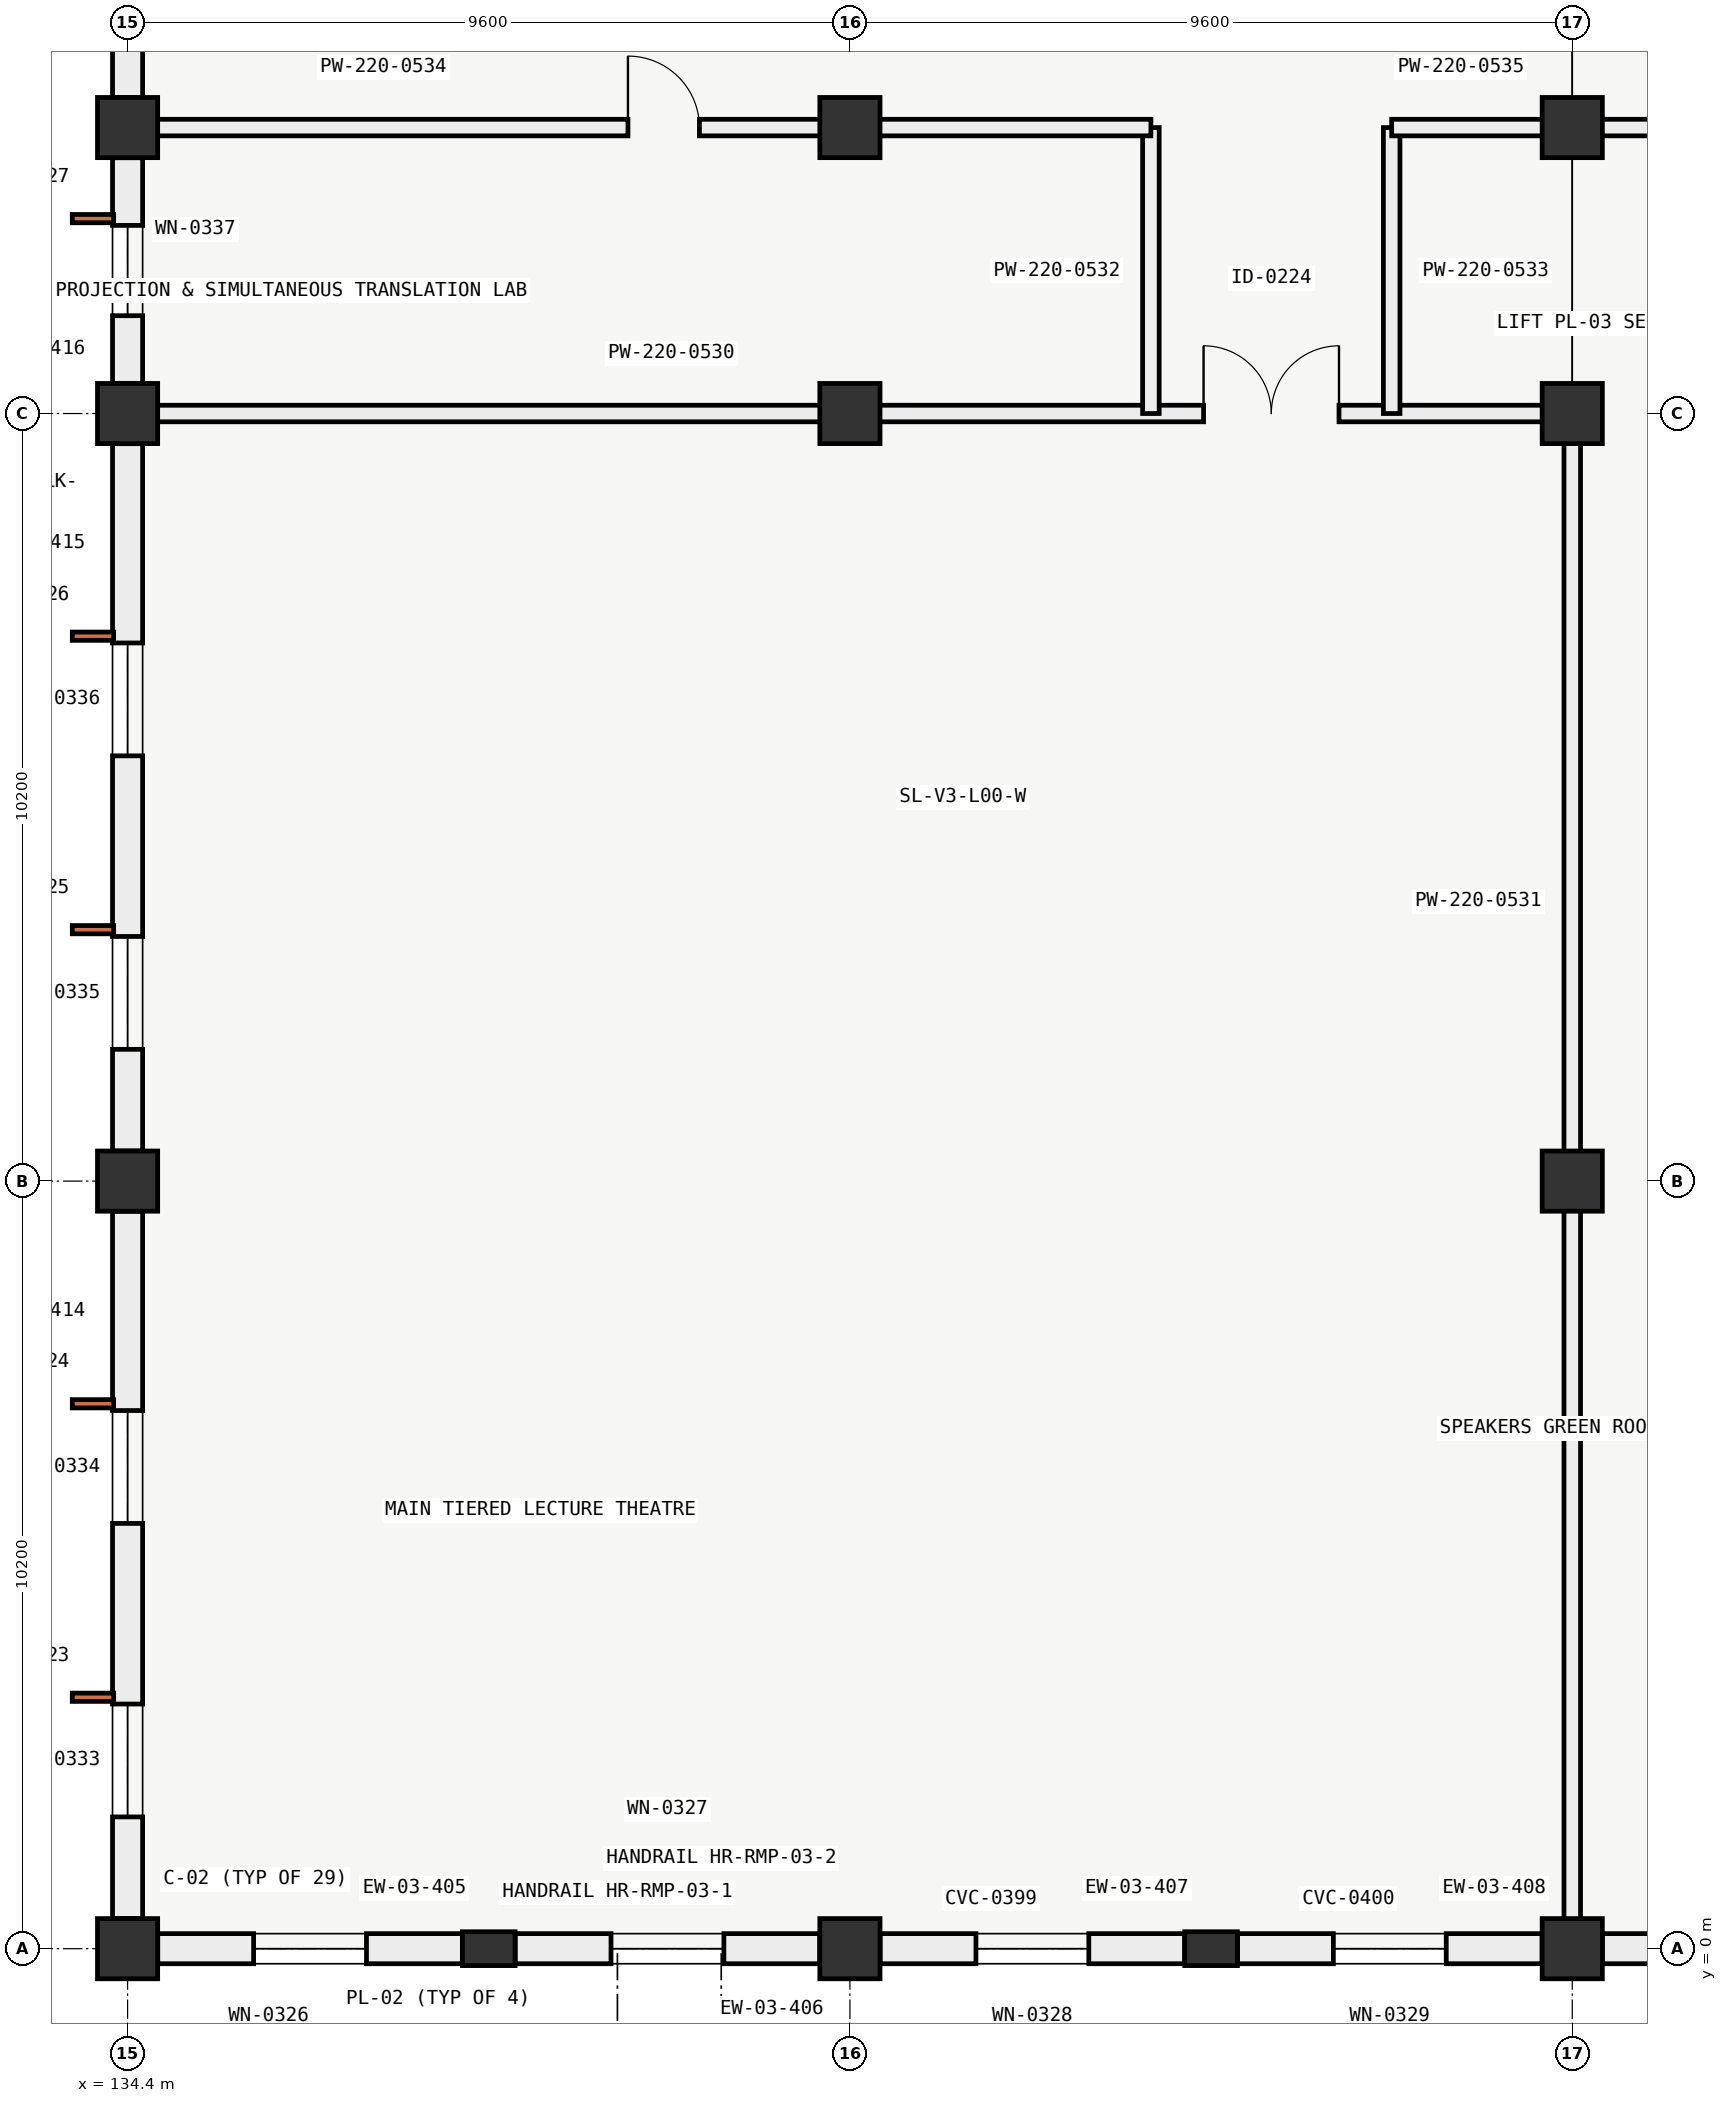
"""IFC4 building model, lengths in metres.
Left out: names, types, materials, properties, quantities, classifications, styles, units other than length and angle.
Written with IfcOpenShell. Run it as: python <this file> out.ifc"""

import sys

from ifc_helpers import new_model, si_unit, direction, frame, frame_2d, origin, origin_2d, place, context, subcontext, project, spatial, rectangle, extrude, element, fill, save


model = new_model("IFC4")
c1 = context("Model", 3, precision=1e-05, world=origin(), true_north=direction((0.0, 1.0)))
c2 = subcontext(c1, "Body", "Model", "MODEL_VIEW")
j1 = project(units=[si_unit("LENGTHUNIT", "METRE"), si_unit("PLANEANGLEUNIT", "RADIAN")], contexts=[c1])
p1 = place(None, origin())
s1 = spatial("IfcSite", under=j1, at=p1, CompositionType="ELEMENT")
p2 = place(p1, origin())
s2 = spatial("IfcBuilding", under=s1, at=p2, CompositionType="ELEMENT")
p3 = place(p2, origin())
s3 = spatial("IfcBuildingStorey", under=s2, at=p3, CompositionType="ELEMENT", Elevation=0.0)
for number, where, z_axis, x_axis in (
    (1, (134.4, 0.0, 0.0), (0.0, 0.0, 1.0), (1.0, 0.0, 0.0)),
    (2, (134.4, 10.2, 0.0), (0.0, 0.0, 1.0), (1.0, 0.0, 0.0)),
    (3, (134.4, 20.4, 0.0), (0.0, 0.0, 1.0), (1.0, 0.0, 0.0)),
    (4, (134.4, 24.2, 0.0), (0.0, 0.0, 1.0), (1.0, 0.0, 0.0)),
    (5, (144.0, 0.0, 0.0), (0.0, 0.0, 1.0), (1.0, 0.0, 0.0)),
    (6, (144.0, 20.4, 0.0), (0.0, 0.0, 1.0), (1.0, 0.0, 0.0)),
    (7, (144.0, 24.2, 0.0), (0.0, 0.0, 1.0), (1.0, 0.0, 0.0)),
    (8, (153.6, 0.0, 0.0), (0.0, 0.0, 1.0), (1.0, 0.0, 0.0)),
    (9, (153.6, 10.2, 0.0), (0.0, 0.0, 1.0), (1.0, 0.0, 0.0)),
    (10, (153.6, 20.4, 0.0), (0.0, 0.0, 1.0), (1.0, 0.0, 0.0)),
    (11, (153.6, 24.2, 0.0), (0.0, 0.0, 1.0), (1.0, 0.0, 0.0)),
):
    element("IfcColumn", number, at=place(p3, frame(where, z_axis=z_axis, x_axis=x_axis)), inside=s3, PredefinedType="COLUMN", context=c2, shape_type="SweptSolid", body=[
        extrude(rectangle(XDim=0.8, YDim=0.8, at=origin_2d()), origin(), (0.0, 0.0, 1.0), 5.4),
    ])
for number, where, z_axis, x_axis in (
    (12, (139.2, 0.0, 0.0), (0.0, 0.0, 1.0), (0.0, 1.0, 0.0)),
    (13, (148.8, 0.0, 0.0), (0.0, 0.0, 1.0), (0.0, 1.0, 0.0)),
):
    element("IfcColumn", number, at=place(p3, frame(where, z_axis=z_axis, x_axis=x_axis)), inside=s3, PredefinedType="PILASTER", context=c2, shape_type="SweptSolid", body=[
        extrude(rectangle(XDim=0.45, YDim=0.7, at=origin_2d()), origin(), (0.0, 0.0, 1.0), 5.4),
    ])
p4 = place(p3, frame((138.849, 0.0, 0.0), z_axis=(0.0, 0.0, 1.0), x_axis=(-1.0, 0.0, 0.0)))
e14 = element("IfcWall", 14, at=p4, inside=s3, PredefinedType="SOLIDWALL", context=c2, shape_type="SweptSolid", body=[
    extrude(rectangle(XDim=4.048, YDim=0.4, at=frame_2d((2.024, 0.0))), origin(), (0.0, 0.0, 1.0), 4.5),
])
p5 = place(p4, frame((1.274, 0.0, 0.85)))
e15 = element("IfcOpeningElement", 15, at=p5, cuts=e14, PredefinedType="OPENING", context=c2, shape_type="SweptSolid", body=[
    extrude(rectangle(XDim=1.5, YDim=2.6, at=frame_2d((0.75, 1.3))), frame((0.0, 0.21, 0.0), z_axis=(0.0, -1.0, 0.0), x_axis=(1.0, 0.0, 0.0)), (0.0, 0.0, 1.0), 0.42),
])
p6 = place(p3, frame((143.599, 0.0, 0.0), z_axis=(0.0, 0.0, 1.0), x_axis=(-1.0, 0.0, 0.0)))
e16 = element("IfcWall", 16, at=p6, inside=s3, PredefinedType="SOLIDWALL", context=c2, shape_type="SweptSolid", body=[
    extrude(rectangle(XDim=4.048, YDim=0.4, at=frame_2d((2.024, 0.0))), origin(), (0.0, 0.0, 1.0), 4.5),
])
p7 = place(p6, frame((1.274, 0.0, 0.85)))
e17 = element("IfcOpeningElement", 17, at=p7, cuts=e16, PredefinedType="OPENING", context=c2, shape_type="SweptSolid", body=[
    extrude(rectangle(XDim=1.5, YDim=2.6, at=frame_2d((0.75, 1.3))), frame((0.0, 0.21, 0.0), z_axis=(0.0, -1.0, 0.0), x_axis=(1.0, 0.0, 0.0)), (0.0, 0.0, 1.0), 0.42),
])
p8 = place(p3, frame((148.449, 0.0, 0.0), z_axis=(0.0, 0.0, 1.0), x_axis=(-1.0, 0.0, 0.0)))
e18 = element("IfcWall", 18, at=p8, inside=s3, PredefinedType="SOLIDWALL", context=c2, shape_type="SweptSolid", body=[
    extrude(rectangle(XDim=4.048, YDim=0.4, at=frame_2d((2.024, 0.0))), origin(), (0.0, 0.0, 1.0), 4.5),
])
p9 = place(p8, frame((1.274, 0.0, 0.85)))
e19 = element("IfcOpeningElement", 19, at=p9, cuts=e18, PredefinedType="OPENING", context=c2, shape_type="SweptSolid", body=[
    extrude(rectangle(XDim=1.5, YDim=2.6, at=frame_2d((0.75, 1.3))), frame((0.0, 0.21, 0.0), z_axis=(0.0, -1.0, 0.0), x_axis=(1.0, 0.0, 0.0)), (0.0, 0.0, 1.0), 0.42),
])
p10 = place(p3, frame((153.199, 0.0, 0.0), z_axis=(0.0, 0.0, 1.0), x_axis=(-1.0, 0.0, 0.0)))
e20 = element("IfcWall", 20, at=p10, inside=s3, PredefinedType="SOLIDWALL", context=c2, shape_type="SweptSolid", body=[
    extrude(rectangle(XDim=4.048, YDim=0.4, at=frame_2d((2.024, 0.0))), origin(), (0.0, 0.0, 1.0), 4.5),
])
p11 = place(p10, frame((1.274, 0.0, 0.85)))
e21 = element("IfcOpeningElement", 21, at=p11, cuts=e20, PredefinedType="OPENING", context=c2, shape_type="SweptSolid", body=[
    extrude(rectangle(XDim=1.5, YDim=2.6, at=frame_2d((0.75, 1.3))), frame((0.0, 0.21, 0.0), z_axis=(0.0, -1.0, 0.0), x_axis=(1.0, 0.0, 0.0)), (0.0, 0.0, 1.0), 0.42),
])
p12 = place(p3, frame((158.049, 0.0, 0.0), z_axis=(0.0, 0.0, 1.0), x_axis=(-1.0, 0.0, 0.0)))
e22 = element("IfcWall", 22, at=p12, inside=s3, PredefinedType="SOLIDWALL", context=c2, shape_type="SweptSolid", body=[
    extrude(rectangle(XDim=4.048, YDim=0.4, at=frame_2d((2.024, 0.0))), origin(), (0.0, 0.0, 1.0), 4.45),
])
p13 = place(p12, frame((1.274, 0.0, 0.85)))
e23 = element("IfcOpeningElement", 23, at=p13, cuts=e22, PredefinedType="OPENING", context=c2, shape_type="SweptSolid", body=[
    extrude(rectangle(XDim=1.5, YDim=2.6, at=frame_2d((0.75, 1.3))), frame((0.0, 0.21, 0.0), z_axis=(0.0, -1.0, 0.0), x_axis=(1.0, 0.0, 0.0)), (0.0, 0.0, 1.0), 0.42),
])
p14 = place(p3, frame((134.4, 0.401, 0.0), z_axis=(0.0, 0.0, 1.0), x_axis=(0.0, 1.0, 0.0)))
e24 = element("IfcWall", 24, at=p14, inside=s3, PredefinedType="SOLIDWALL", context=c2, shape_type="SweptSolid", body=[
    extrude(rectangle(XDim=9.398, YDim=0.4, at=frame_2d((4.699, 0.0))), origin(), (0.0, 0.0, 1.0), 4.5),
])
p15 = place(p14, frame((1.35, 0.0, 0.85)))
e25 = element("IfcOpeningElement", 25, at=p15, cuts=e24, PredefinedType="OPENING", context=c2, shape_type="SweptSolid", body=[
    extrude(rectangle(XDim=1.5, YDim=2.6, at=frame_2d((0.75, 1.3))), frame((0.0, 0.21, 0.0), z_axis=(0.0, -1.0, 0.0), x_axis=(1.0, 0.0, 0.0)), (0.0, 0.0, 1.0), 0.42),
])
p16 = place(p14, frame((5.25, 0.0, 0.85)))
e26 = element("IfcOpeningElement", 26, at=p16, cuts=e24, PredefinedType="OPENING", context=c2, shape_type="SweptSolid", body=[
    extrude(rectangle(XDim=1.5, YDim=2.6, at=frame_2d((0.75, 1.3))), frame((0.0, 0.21, 0.0), z_axis=(0.0, -1.0, 0.0), x_axis=(1.0, 0.0, 0.0)), (0.0, 0.0, 1.0), 0.42),
])
p17 = place(p3, frame((134.4, 10.601, 0.0), z_axis=(0.0, 0.0, 1.0), x_axis=(0.0, 1.0, 0.0)))
e27 = element("IfcWall", 27, at=p17, inside=s3, PredefinedType="SOLIDWALL", context=c2, shape_type="SweptSolid", body=[
    extrude(rectangle(XDim=9.398, YDim=0.4, at=frame_2d((4.699, 0.0))), origin(), (0.0, 0.0, 1.0), 4.5),
])
p18 = place(p17, frame((1.35, 0.0, 0.85)))
e28 = element("IfcOpeningElement", 28, at=p18, cuts=e27, PredefinedType="OPENING", context=c2, shape_type="SweptSolid", body=[
    extrude(rectangle(XDim=1.5, YDim=2.6, at=frame_2d((0.75, 1.3))), frame((0.0, 0.21, 0.0), z_axis=(0.0, -1.0, 0.0), x_axis=(1.0, 0.0, 0.0)), (0.0, 0.0, 1.0), 0.42),
])
p19 = place(p17, frame((5.25, 0.0, 0.85)))
e29 = element("IfcOpeningElement", 29, at=p19, cuts=e27, PredefinedType="OPENING", context=c2, shape_type="SweptSolid", body=[
    extrude(rectangle(XDim=1.5, YDim=2.6, at=frame_2d((0.75, 1.3))), frame((0.0, 0.21, 0.0), z_axis=(0.0, -1.0, 0.0), x_axis=(1.0, 0.0, 0.0)), (0.0, 0.0, 1.0), 0.42),
])
p20 = place(p3, frame((134.4, 20.801, 0.0), z_axis=(0.0, 0.0, 1.0), x_axis=(0.0, 1.0, 0.0)))
e30 = element("IfcWall", 30, at=p20, inside=s3, PredefinedType="SOLIDWALL", context=c2, shape_type="SweptSolid", body=[
    extrude(rectangle(XDim=2.998, YDim=0.4, at=frame_2d((1.499, 0.0))), origin(), (0.0, 0.0, 1.0), 4.45),
])
p21 = place(p20, frame((0.899, 0.0, 0.9)))
e31 = element("IfcOpeningElement", 31, at=p21, cuts=e30, PredefinedType="OPENING", context=c2, shape_type="SweptSolid", body=[
    extrude(rectangle(XDim=1.2, YDim=1.8, at=frame_2d((0.6, 0.9))), frame((0.0, 0.21, 0.0), z_axis=(0.0, -1.0, 0.0), x_axis=(1.0, 0.0, 0.0)), (0.0, 0.0, 1.0), 0.42),
])
p22 = place(p3, frame((134.4, 24.601, 0.0), z_axis=(0.0, 0.0, 1.0), x_axis=(0.0, 1.0, 0.0)))
e32 = element("IfcWall", 32, at=p22, inside=s3, PredefinedType="SOLIDWALL", context=c2, shape_type="SweptSolid", body=[
    extrude(rectangle(XDim=2.398, YDim=0.4, at=frame_2d((1.199, 0.0))), origin(), (0.0, 0.0, 1.0), 4.45),
])
p23 = place(p3, frame((134.55, 20.4, 0.0), z_axis=(0.0, 0.0, 1.0), x_axis=(1.0, 0.0, 0.0)))
e33 = element("IfcWall", 33, at=p23, inside=s3, PredefinedType="PARTITIONING", context=c2, shape_type="SweptSolid", body=[
    extrude(rectangle(XDim=19.05, YDim=0.22, at=frame_2d((9.525, 0.0))), origin(), (0.0, 0.0, 1.0), 4.4),
])
p24 = place(p23, frame((14.15, 0.0, 0.0)))
e34 = element("IfcOpeningElement", 34, at=p24, cuts=e33, PredefinedType="OPENING", context=c2, shape_type="SweptSolid", body=[
    extrude(rectangle(XDim=1.8, YDim=2.2, at=frame_2d((0.9, 1.1))), frame((0.0, 0.12, 0.0), z_axis=(0.0, -1.0, 0.0), x_axis=(1.0, 0.0, 0.0)), (0.0, 0.0, 1.0), 0.24),
])
p25 = place(p3, frame((153.6, 0.15, 0.0), z_axis=(0.0, 0.0, 1.0), x_axis=(0.0, 1.0, 0.0)))
e35 = element("IfcWall", 35, at=p25, inside=s3, PredefinedType="PARTITIONING", context=c2, shape_type="SweptSolid", body=[
    extrude(rectangle(XDim=20.25, YDim=0.22, at=frame_2d((10.125, 0.0))), origin(), (0.0, 0.0, 1.0), 4.4),
])
for number, where, z_axis, x_axis in (
    (36, (148.0, 20.4, 0.0), (0.0, 0.0, 1.0), (0.0, 1.0, 0.0)),
    (37, (151.2, 20.4, 0.0), (0.0, 0.0, 1.0), (0.0, 1.0, 0.0)),
):
    element("IfcWall", number, at=place(p3, frame(where, z_axis=z_axis, x_axis=x_axis)), inside=s3, PredefinedType="PARTITIONING", context=c2, shape_type="SweptSolid", body=[
        extrude(rectangle(XDim=3.8, YDim=0.22, at=frame_2d((1.9, 0.0))), origin(), (0.0, 0.0, 1.0), 4.4),
    ])
p26 = place(p3, frame((134.55, 24.2, 0.0), z_axis=(0.0, 0.0, 1.0), x_axis=(1.0, 0.0, 0.0)))
e38 = element("IfcWall", 38, at=p26, inside=s3, PredefinedType="PARTITIONING", context=c2, shape_type="SweptSolid", body=[
    extrude(rectangle(XDim=13.45, YDim=0.22, at=frame_2d((6.725, 0.0))), origin(), (0.0, 0.0, 1.0), 4.45),
])
p27 = place(p26, frame((6.5, 0.0, 0.0)))
e39 = element("IfcOpeningElement", 39, at=p27, cuts=e38, PredefinedType="OPENING", context=c2, shape_type="SweptSolid", body=[
    extrude(rectangle(XDim=0.95, YDim=2.1, at=frame_2d((0.475, 1.05))), frame((0.0, 0.12, 0.0), z_axis=(0.0, -1.0, 0.0), x_axis=(1.0, 0.0, 0.0)), (0.0, 0.0, 1.0), 0.24),
])
p28 = place(p3, frame((151.2, 24.2, 0.0), z_axis=(0.0, 0.0, 1.0), x_axis=(1.0, 0.0, 0.0)))
e40 = element("IfcWall", 40, at=p28, inside=s3, PredefinedType="PARTITIONING", context=c2, shape_type="SweptSolid", body=[
    extrude(rectangle(XDim=7.55, YDim=0.22, at=frame_2d((3.775, 0.0))), origin(), (0.0, 0.0, 1.0), 4.45),
])
p29 = place(p28, frame((4.6, 0.0, 0.0)))
e41 = element("IfcOpeningElement", 41, at=p29, cuts=e40, PredefinedType="OPENING", context=c2, shape_type="SweptSolid", body=[
    extrude(rectangle(XDim=0.95, YDim=2.1, at=frame_2d((0.475, 1.05))), frame((0.0, 0.12, 0.0), z_axis=(0.0, -1.0, 0.0), x_axis=(1.0, 0.0, 0.0)), (0.0, 0.0, 1.0), 0.24),
])
p30 = place(p5, origin())
e42 = element("IfcWindow", 42, at=p30, inside=s3, PartitioningType="SINGLE_PANEL", PredefinedType="WINDOW", context=c2, shape_type="SweptSolid", body=[
    extrude(rectangle(XDim=1.5, YDim=2.6, at=frame_2d((0.75, 1.3))), frame((0.0, 0.03, 0.0), z_axis=(0.0, -1.0, 0.0), x_axis=(1.0, 0.0, 0.0)), (0.0, 0.0, 1.0), 0.06),
])
fill(e15, e42)
p31 = place(p7, origin())
e43 = element("IfcWindow", 43, at=p31, inside=s3, PartitioningType="SINGLE_PANEL", PredefinedType="WINDOW", context=c2, shape_type="SweptSolid", body=[
    extrude(rectangle(XDim=1.5, YDim=2.6, at=frame_2d((0.75, 1.3))), frame((0.0, 0.03, 0.0), z_axis=(0.0, -1.0, 0.0), x_axis=(1.0, 0.0, 0.0)), (0.0, 0.0, 1.0), 0.06),
])
fill(e17, e43)
p32 = place(p9, origin())
e44 = element("IfcWindow", 44, at=p32, inside=s3, PartitioningType="SINGLE_PANEL", PredefinedType="WINDOW", context=c2, shape_type="SweptSolid", body=[
    extrude(rectangle(XDim=1.5, YDim=2.6, at=frame_2d((0.75, 1.3))), frame((0.0, 0.03, 0.0), z_axis=(0.0, -1.0, 0.0), x_axis=(1.0, 0.0, 0.0)), (0.0, 0.0, 1.0), 0.06),
])
fill(e19, e44)
p33 = place(p11, origin())
e45 = element("IfcWindow", 45, at=p33, inside=s3, PartitioningType="SINGLE_PANEL", PredefinedType="WINDOW", context=c2, shape_type="SweptSolid", body=[
    extrude(rectangle(XDim=1.5, YDim=2.6, at=frame_2d((0.75, 1.3))), frame((0.0, 0.03, 0.0), z_axis=(0.0, -1.0, 0.0), x_axis=(1.0, 0.0, 0.0)), (0.0, 0.0, 1.0), 0.06),
])
fill(e21, e45)
p34 = place(p15, origin())
e46 = element("IfcWindow", 46, at=p34, inside=s3, PartitioningType="SINGLE_PANEL", PredefinedType="WINDOW", context=c2, shape_type="SweptSolid", body=[
    extrude(rectangle(XDim=1.5, YDim=2.6, at=frame_2d((0.75, 1.3))), frame((0.0, 0.03, 0.0), z_axis=(0.0, -1.0, 0.0), x_axis=(1.0, 0.0, 0.0)), (0.0, 0.0, 1.0), 0.06),
])
fill(e25, e46)
p35 = place(p16, origin())
e47 = element("IfcWindow", 47, at=p35, inside=s3, PartitioningType="SINGLE_PANEL", PredefinedType="WINDOW", context=c2, shape_type="SweptSolid", body=[
    extrude(rectangle(XDim=1.5, YDim=2.6, at=frame_2d((0.75, 1.3))), frame((0.0, 0.03, 0.0), z_axis=(0.0, -1.0, 0.0), x_axis=(1.0, 0.0, 0.0)), (0.0, 0.0, 1.0), 0.06),
])
fill(e26, e47)
p36 = place(p18, origin())
e48 = element("IfcWindow", 48, at=p36, inside=s3, PartitioningType="SINGLE_PANEL", PredefinedType="WINDOW", context=c2, shape_type="SweptSolid", body=[
    extrude(rectangle(XDim=1.5, YDim=2.6, at=frame_2d((0.75, 1.3))), frame((0.0, 0.03, 0.0), z_axis=(0.0, -1.0, 0.0), x_axis=(1.0, 0.0, 0.0)), (0.0, 0.0, 1.0), 0.06),
])
fill(e28, e48)
p37 = place(p19, origin())
e49 = element("IfcWindow", 49, at=p37, inside=s3, PartitioningType="SINGLE_PANEL", PredefinedType="WINDOW", context=c2, shape_type="SweptSolid", body=[
    extrude(rectangle(XDim=1.5, YDim=2.6, at=frame_2d((0.75, 1.3))), frame((0.0, 0.03, 0.0), z_axis=(0.0, -1.0, 0.0), x_axis=(1.0, 0.0, 0.0)), (0.0, 0.0, 1.0), 0.06),
])
fill(e29, e49)
p38 = place(p21, origin())
e50 = element("IfcWindow", 50, at=p38, inside=s3, PartitioningType="SINGLE_PANEL", PredefinedType="WINDOW", context=c2, shape_type="SweptSolid", body=[
    extrude(rectangle(XDim=1.2, YDim=1.8, at=frame_2d((0.6, 0.9))), frame((0.0, 0.03, 0.0), z_axis=(0.0, -1.0, 0.0), x_axis=(1.0, 0.0, 0.0)), (0.0, 0.0, 1.0), 0.06),
])
fill(e31, e50)
p39 = place(p24, origin())
e51 = element("IfcDoor", 51, at=p39, inside=s3, OperationType="DOUBLE_DOOR_SINGLE_SWING", PredefinedType="DOOR", context=c2, shape_type="SweptSolid", body=[
    extrude(rectangle(XDim=1.8, YDim=2.2, at=frame_2d((0.9, 1.1))), frame((0.0, 0.025, 0.0), z_axis=(0.0, -1.0, 0.0), x_axis=(1.0, 0.0, 0.0)), (0.0, 0.0, 1.0), 0.05),
])
fill(e34, e51)
p40 = place(p27, origin())
e52 = element("IfcDoor", 52, at=p40, inside=s3, OperationType="SINGLE_SWING_LEFT", PredefinedType="DOOR", context=c2, shape_type="SweptSolid", body=[
    extrude(rectangle(XDim=0.95, YDim=2.1, at=frame_2d((0.475, 1.05))), frame((0.0, 0.025, 0.0), z_axis=(0.0, -1.0, 0.0), x_axis=(1.0, 0.0, 0.0)), (0.0, 0.0, 1.0), 0.05),
])
fill(e39, e52)
save(model, sys.argv[1])
